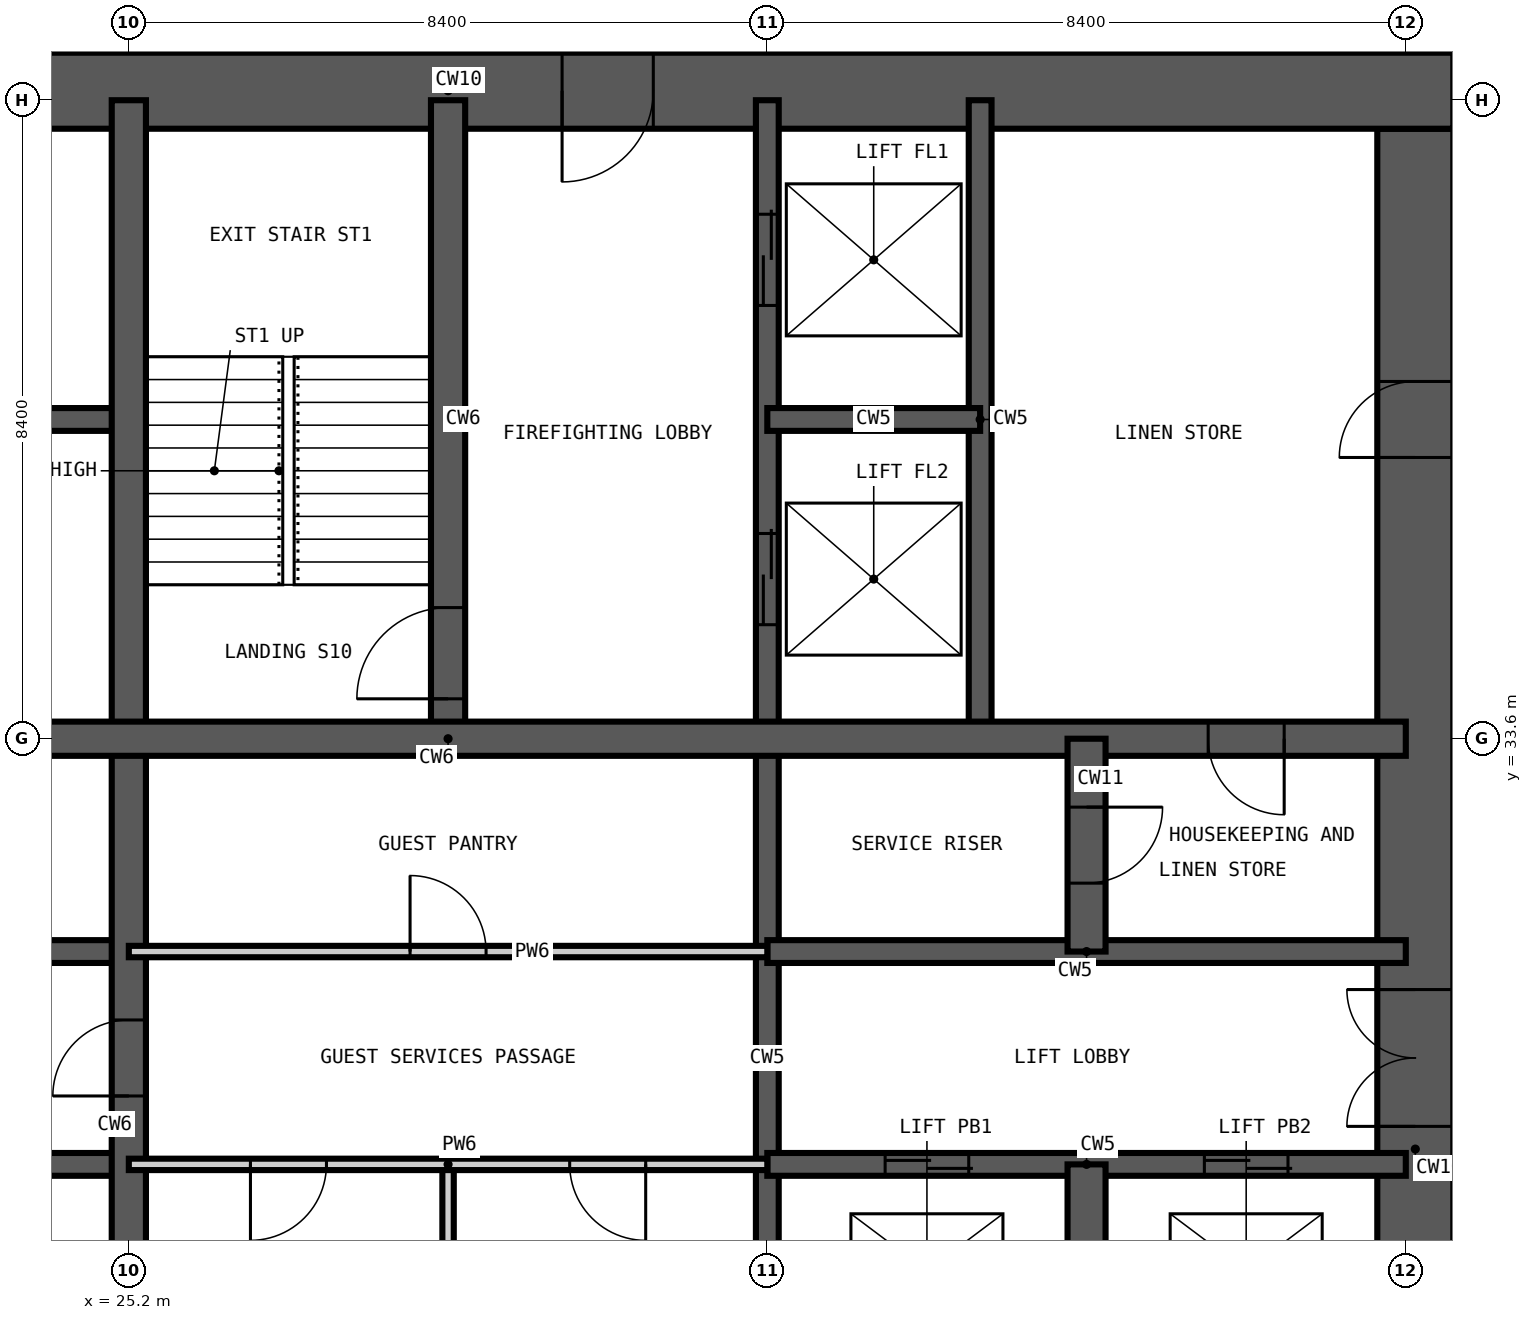
"""IFC4 building model, lengths in metres.
Left out: names, types, materials, properties, quantities, classifications, styles, units other than length and angle.
Written with IfcOpenShell. Run it as: python <this file> out.ifc"""

import sys

from ifc_helpers import new_model, si_unit, direction, frame, frame_2d, origin, place, context, subcontext, project, spatial, rectangle, extrude, element, fill, save


model = new_model("IFC4")
c1 = context("Model", 3, precision=1e-05, world=origin(), true_north=direction((0.0, 1.0)))
c2 = subcontext(c1, "Body", "Model", "MODEL_VIEW")
j1 = project(units=[si_unit("LENGTHUNIT", "METRE"), si_unit("PLANEANGLEUNIT", "RADIAN")], contexts=[c1])
p1 = place(None, origin())
s1 = spatial("IfcSite", under=j1, at=p1, CompositionType="ELEMENT")
p2 = place(p1, origin())
s2 = spatial("IfcBuilding", under=s1, at=p2, CompositionType="ELEMENT")
p3 = place(p2, frame((0.0, 0.0, 118.8)))
s3 = spatial("IfcBuildingStorey", under=s2, at=p3, CompositionType="ELEMENT", Elevation=118.8)
p4 = place(p3, frame((42.125, 17.175, -0.35), z_axis=(0.0, 0.0, 1.0), x_axis=(0.0, 1.0, 0.0)))
e1 = element("IfcWall", 1, at=p4, inside=s3, PredefinedType="SHEAR", context=c2, shape_type="SweptSolid", body=[
    extrude(rectangle(XDim=24.45, YDim=1.0, at=frame_2d((12.225, 0.0))), origin(), (0.0, 0.0, 1.0), 3.6),
])
p5 = place(p4, frame((0.425, 0.0, 0.35)))
e2 = element("IfcOpeningElement", 2, at=p5, cuts=e1, PredefinedType="OPENING", context=c2, shape_type="SweptSolid", body=[
    extrude(rectangle(XDim=1.2, YDim=2.2, at=frame_2d((0.6, 1.1))), frame((0.0, 0.51, 0.0), z_axis=(0.0, -1.0, 0.0), x_axis=(1.0, 0.0, 0.0)), (0.0, 0.0, 1.0), 1.02),
])
p6 = place(p4, frame((11.325, 0.0, 0.35)))
e3 = element("IfcOpeningElement", 3, at=p6, cuts=e1, PredefinedType="OPENING", context=c2, shape_type="SweptSolid", body=[
    extrude(rectangle(XDim=1.8, YDim=2.2, at=frame_2d((0.9, 1.1))), frame((0.0, 0.51, 0.0), z_axis=(0.0, -1.0, 0.0), x_axis=(1.0, 0.0, 0.0)), (0.0, 0.0, 1.0), 1.02),
])
p7 = place(p4, frame((20.125, 0.0, 0.35)))
e4 = element("IfcOpeningElement", 4, at=p7, cuts=e1, PredefinedType="OPENING", context=c2, shape_type="SweptSolid", body=[
    extrude(rectangle(XDim=1.0, YDim=2.1, at=frame_2d((0.5, 1.05))), frame((0.0, 0.51, 0.0), z_axis=(0.0, -1.0, 0.0), x_axis=(1.0, 0.0, 0.0)), (0.0, 0.0, 1.0), 1.02),
])
p8 = place(p3, frame((42.625, 42.125, -0.35), z_axis=(0.0, 0.0, 1.0), x_axis=(-1.0, 0.0, 0.0)))
e5 = element("IfcWall", 5, at=p8, inside=s3, PredefinedType="SHEAR", context=c2, shape_type="SweptSolid", body=[
    extrude(rectangle(XDim=26.45, YDim=1.0, at=frame_2d((13.225, 0.0))), origin(), (0.0, 0.0, 1.0), 3.6),
])
p9 = place(p8, frame((21.125, 0.0, 0.35)))
e6 = element("IfcOpeningElement", 6, at=p9, cuts=e5, PredefinedType="OPENING", context=c2, shape_type="SweptSolid", body=[
    extrude(rectangle(XDim=1.0, YDim=2.1, at=frame_2d((0.5, 1.05))), frame((0.0, 0.51, 0.0), z_axis=(0.0, -1.0, 0.0), x_axis=(1.0, 0.0, 0.0)), (0.0, 0.0, 1.0), 1.02),
])
p10 = place(p8, frame((10.525, 0.0, 0.35)))
e7 = element("IfcOpeningElement", 7, at=p10, cuts=e5, PredefinedType="OPENING", context=c2, shape_type="SweptSolid", body=[
    extrude(rectangle(XDim=1.2, YDim=2.2, at=frame_2d((0.6, 1.1))), frame((0.0, 0.51, 0.0), z_axis=(0.0, -1.0, 0.0), x_axis=(1.0, 0.0, 0.0)), (0.0, 0.0, 1.0), 1.02),
])
p11 = place(p3, frame((33.6, 16.8, -0.35), z_axis=(0.0, 0.0, 1.0), x_axis=(0.0, 1.0, 0.0)))
e8 = element("IfcWall", 8, at=p11, inside=s3, PredefinedType="SHEAR", context=c2, shape_type="SweptSolid", body=[
    extrude(rectangle(XDim=25.2, YDim=0.3, at=frame_2d((12.6, 0.0))), origin(), (0.0, 0.0, 1.0), 3.6),
])
p12 = place(p11, frame((22.5, 0.0, 0.35)))
e9 = element("IfcOpeningElement", 9, at=p12, cuts=e8, PredefinedType="OPENING", context=c2, shape_type="SweptSolid", body=[
    extrude(rectangle(XDim=1.2, YDim=2.2, at=frame_2d((0.6, 1.1))), frame((0.0, 0.16, 0.0), z_axis=(0.0, -1.0, 0.0), x_axis=(1.0, 0.0, 0.0)), (0.0, 0.0, 1.0), 0.32),
])
p13 = place(p11, frame((18.3, 0.0, 0.35)))
e10 = element("IfcOpeningElement", 10, at=p13, cuts=e8, PredefinedType="OPENING", context=c2, shape_type="SweptSolid", body=[
    extrude(rectangle(XDim=1.2, YDim=2.2, at=frame_2d((0.6, 1.1))), frame((0.0, 0.16, 0.0), z_axis=(0.0, -1.0, 0.0), x_axis=(1.0, 0.0, 0.0)), (0.0, 0.0, 1.0), 0.32),
])
p14 = place(p3, frame((36.4, 33.6, -0.35), z_axis=(0.0, 0.0, 1.0), x_axis=(0.0, 1.0, 0.0)))
e11 = element("IfcWall", 11, at=p14, inside=s3, PredefinedType="SHEAR", context=c2, shape_type="SweptSolid", body=[
    extrude(rectangle(XDim=8.4, YDim=0.3, at=frame_2d((4.2, 0.0))), origin(), (0.0, 0.0, 1.0), 3.6),
])
p15 = place(p3, frame((16.8, 28.0, -0.35), z_axis=(0.0, 0.0, 1.0), x_axis=(1.0, 0.0, 0.0)))
e12 = element("IfcWall", 12, at=p15, inside=s3, PredefinedType="SHEAR", context=c2, shape_type="SweptSolid", body=[
    extrude(rectangle(XDim=8.4, YDim=0.3, at=frame_2d((4.2, 0.0))), origin(), (0.0, 0.0, 1.0), 3.6),
])
p16 = place(p15, frame((1.55, 0.0, 0.35)))
e13 = element("IfcOpeningElement", 13, at=p16, cuts=e12, PredefinedType="OPENING", context=c2, shape_type="SweptSolid", body=[
    extrude(rectangle(XDim=1.1, YDim=2.2, at=frame_2d((0.55, 1.1))), frame((0.0, 0.16, 0.0), z_axis=(0.0, -1.0, 0.0), x_axis=(1.0, 0.0, 0.0)), (0.0, 0.0, 1.0), 0.32),
])
p17 = place(p15, frame((5.75, 0.0, 0.35)))
e14 = element("IfcOpeningElement", 14, at=p17, cuts=e12, PredefinedType="OPENING", context=c2, shape_type="SweptSolid", body=[
    extrude(rectangle(XDim=1.1, YDim=2.2, at=frame_2d((0.55, 1.1))), frame((0.0, 0.16, 0.0), z_axis=(0.0, -1.0, 0.0), x_axis=(1.0, 0.0, 0.0)), (0.0, 0.0, 1.0), 0.32),
])
p18 = place(p3, frame((33.6, 28.0, -0.35), z_axis=(0.0, 0.0, 1.0), x_axis=(1.0, 0.0, 0.0)))
e15 = element("IfcWall", 15, at=p18, inside=s3, PredefinedType="SHEAR", context=c2, shape_type="SweptSolid", body=[
    extrude(rectangle(XDim=8.4, YDim=0.3, at=frame_2d((4.2, 0.0))), origin(), (0.0, 0.0, 1.0), 3.6),
])
p19 = place(p18, frame((1.55, 0.0, 0.35)))
e16 = element("IfcOpeningElement", 16, at=p19, cuts=e15, PredefinedType="OPENING", context=c2, shape_type="SweptSolid", body=[
    extrude(rectangle(XDim=1.1, YDim=2.2, at=frame_2d((0.55, 1.1))), frame((0.0, 0.16, 0.0), z_axis=(0.0, -1.0, 0.0), x_axis=(1.0, 0.0, 0.0)), (0.0, 0.0, 1.0), 0.32),
])
p20 = place(p18, frame((5.75, 0.0, 0.35)))
e17 = element("IfcOpeningElement", 17, at=p20, cuts=e15, PredefinedType="OPENING", context=c2, shape_type="SweptSolid", body=[
    extrude(rectangle(XDim=1.1, YDim=2.2, at=frame_2d((0.55, 1.1))), frame((0.0, 0.16, 0.0), z_axis=(0.0, -1.0, 0.0), x_axis=(1.0, 0.0, 0.0)), (0.0, 0.0, 1.0), 0.32),
])
p21 = place(p3, frame((16.8, 30.8, -0.35), z_axis=(0.0, 0.0, 1.0), x_axis=(1.0, 0.0, 0.0)))
e18 = element("IfcWall", 18, at=p21, inside=s3, PredefinedType="SHEAR", context=c2, shape_type="SweptSolid", body=[
    extrude(rectangle(XDim=8.4, YDim=0.3, at=frame_2d((4.2, 0.0))), origin(), (0.0, 0.0, 1.0), 3.6),
])
p22 = place(p21, frame((1.55, 0.0, 0.35)))
e19 = element("IfcOpeningElement", 19, at=p22, cuts=e18, PredefinedType="OPENING", context=c2, shape_type="SweptSolid", body=[
    extrude(rectangle(XDim=1.1, YDim=2.2, at=frame_2d((0.55, 1.1))), frame((0.0, 0.16, 0.0), z_axis=(0.0, -1.0, 0.0), x_axis=(1.0, 0.0, 0.0)), (0.0, 0.0, 1.0), 0.32),
])
p23 = place(p21, frame((5.75, 0.0, 0.35)))
e20 = element("IfcOpeningElement", 20, at=p23, cuts=e18, PredefinedType="OPENING", context=c2, shape_type="SweptSolid", body=[
    extrude(rectangle(XDim=1.1, YDim=2.2, at=frame_2d((0.55, 1.1))), frame((0.0, 0.16, 0.0), z_axis=(0.0, -1.0, 0.0), x_axis=(1.0, 0.0, 0.0)), (0.0, 0.0, 1.0), 0.32),
])
for number, where, z_axis, x_axis in (
    (21, (33.6, 30.8, -0.35), (0.0, 0.0, 1.0), (1.0, 0.0, 0.0)),
    (22, (16.8, 37.8, -0.35), (0.0, 0.0, 1.0), (1.0, 0.0, 0.0)),
):
    element("IfcWall", number, at=place(p3, frame(where, z_axis=z_axis, x_axis=x_axis)), inside=s3, PredefinedType="SHEAR", context=c2, shape_type="SweptSolid", body=[
        extrude(rectangle(XDim=8.4, YDim=0.3, at=frame_2d((4.2, 0.0))), origin(), (0.0, 0.0, 1.0), 3.6),
    ])
p24 = place(p3, frame((33.6, 37.8, -0.35), z_axis=(0.0, 0.0, 1.0), x_axis=(1.0, 0.0, 0.0)))
e23 = element("IfcWall", 23, at=p24, inside=s3, PredefinedType="SHEAR", context=c2, shape_type="SweptSolid", body=[
    extrude(rectangle(XDim=2.8, YDim=0.3, at=frame_2d((1.4, 0.0))), origin(), (0.0, 0.0, 1.0), 3.6),
])
p25 = place(p3, frame((25.2, 16.8, -0.35), z_axis=(0.0, 0.0, 1.0), x_axis=(0.0, 1.0, 0.0)))
e24 = element("IfcWall", 24, at=p25, inside=s3, PredefinedType="SHEAR", context=c2, shape_type="SweptSolid", body=[
    extrude(rectangle(XDim=25.2, YDim=0.45, at=frame_2d((12.6, 0.0))), origin(), (0.0, 0.0, 1.0), 3.6),
])
p26 = place(p25, frame((12.1, 0.0, 0.35)))
e25 = element("IfcOpeningElement", 25, at=p26, cuts=e24, PredefinedType="OPENING", context=c2, shape_type="SweptSolid", body=[
    extrude(rectangle(XDim=1.0, YDim=2.1, at=frame_2d((0.5, 1.05))), frame((0.0, 0.235, 0.0), z_axis=(0.0, -1.0, 0.0), x_axis=(1.0, 0.0, 0.0)), (0.0, 0.0, 1.0), 0.47),
])
p27 = place(p3, frame((29.4, 33.6, -0.35), z_axis=(0.0, 0.0, 1.0), x_axis=(0.0, 1.0, 0.0)))
e26 = element("IfcWall", 26, at=p27, inside=s3, PredefinedType="SHEAR", context=c2, shape_type="SweptSolid", body=[
    extrude(rectangle(XDim=8.4, YDim=0.45, at=frame_2d((4.2, 0.0))), origin(), (0.0, 0.0, 1.0), 3.6),
])
p28 = place(p27, frame((0.525, 0.0, 0.35)))
e27 = element("IfcOpeningElement", 27, at=p28, cuts=e26, PredefinedType="OPENING", context=c2, shape_type="SweptSolid", body=[
    extrude(rectangle(XDim=1.2, YDim=2.2, at=frame_2d((0.6, 1.1))), frame((0.0, 0.235, 0.0), z_axis=(0.0, -1.0, 0.0), x_axis=(1.0, 0.0, 0.0)), (0.0, 0.0, 1.0), 0.47),
])
p29 = place(p3, frame((16.8, 33.6, -0.35), z_axis=(0.0, 0.0, 1.0), x_axis=(1.0, 0.0, 0.0)))
e28 = element("IfcWall", 28, at=p29, inside=s3, PredefinedType="SHEAR", context=c2, shape_type="SweptSolid", body=[
    extrude(rectangle(XDim=25.2, YDim=0.45, at=frame_2d((12.6, 0.0))), origin(), (0.0, 0.0, 1.0), 3.6),
])
p30 = place(p29, frame((22.6, 0.0, 0.35)))
e29 = element("IfcOpeningElement", 29, at=p30, cuts=e28, PredefinedType="OPENING", context=c2, shape_type="SweptSolid", body=[
    extrude(rectangle(XDim=1.0, YDim=2.1, at=frame_2d((0.5, 1.05))), frame((0.0, 0.235, 0.0), z_axis=(0.0, -1.0, 0.0), x_axis=(1.0, 0.0, 0.0)), (0.0, 0.0, 1.0), 0.47),
])
p31 = place(p3, frame((37.8, 16.8, -0.35), z_axis=(0.0, 0.0, 1.0), x_axis=(0.0, 1.0, 0.0)))
e30 = element("IfcWall", 30, at=p31, inside=s3, PredefinedType="SHEAR", context=c2, shape_type="SweptSolid", body=[
    extrude(rectangle(XDim=11.2, YDim=0.5, at=frame_2d((5.6, 0.0))), origin(), (0.0, 0.0, 1.0), 3.6),
])
p32 = place(p3, frame((37.8, 30.8, -0.35), z_axis=(0.0, 0.0, 1.0), x_axis=(0.0, 1.0, 0.0)))
e31 = element("IfcWall", 31, at=p32, inside=s3, PredefinedType="SHEAR", context=c2, shape_type="SweptSolid", body=[
    extrude(rectangle(XDim=2.8, YDim=0.5, at=frame_2d((1.4, 0.0))), origin(), (0.0, 0.0, 1.0), 3.6),
])
p33 = place(p32, frame((0.9, 0.0, 0.35)))
e32 = element("IfcOpeningElement", 32, at=p33, cuts=e31, PredefinedType="OPENING", context=c2, shape_type="SweptSolid", body=[
    extrude(rectangle(XDim=1.0, YDim=2.1, at=frame_2d((0.5, 1.05))), frame((0.0, 0.26, 0.0), z_axis=(0.0, -1.0, 0.0), x_axis=(1.0, 0.0, 0.0)), (0.0, 0.0, 1.0), 0.52),
])
p34 = place(p3, frame((29.4, 25.2, 0.0), z_axis=(0.0, 0.0, 1.0), x_axis=(0.0, 1.0, 0.0)))
e33 = element("IfcWall", 33, at=p34, inside=s3, PredefinedType="PARTITIONING", context=c2, shape_type="SweptSolid", body=[
    extrude(rectangle(XDim=2.8, YDim=0.15, at=frame_2d((1.4, 0.0))), origin(), (0.0, 0.0, 1.0), 3.25),
])
p35 = place(p3, frame((25.2, 28.0, 0.0), z_axis=(0.0, 0.0, 1.0), x_axis=(1.0, 0.0, 0.0)))
e34 = element("IfcWall", 34, at=p35, inside=s3, PredefinedType="PARTITIONING", context=c2, shape_type="SweptSolid", body=[
    extrude(rectangle(XDim=8.4, YDim=0.15, at=frame_2d((4.2, 0.0))), origin(), (0.0, 0.0, 1.0), 3.25),
])
p36 = place(p35, frame((1.6, 0.0, 0.0)))
e35 = element("IfcOpeningElement", 35, at=p36, cuts=e34, PredefinedType="OPENING", context=c2, shape_type="SweptSolid", body=[
    extrude(rectangle(XDim=1.0, YDim=2.1, at=frame_2d((0.5, 1.05))), frame((0.0, 0.085, 0.0), z_axis=(0.0, -1.0, 0.0), x_axis=(1.0, 0.0, 0.0)), (0.0, 0.0, 1.0), 0.17),
])
p37 = place(p35, frame((5.8, 0.0, 0.0)))
e36 = element("IfcOpeningElement", 36, at=p37, cuts=e34, PredefinedType="OPENING", context=c2, shape_type="SweptSolid", body=[
    extrude(rectangle(XDim=1.0, YDim=2.1, at=frame_2d((0.5, 1.05))), frame((0.0, 0.085, 0.0), z_axis=(0.0, -1.0, 0.0), x_axis=(1.0, 0.0, 0.0)), (0.0, 0.0, 1.0), 0.17),
])
p38 = place(p3, frame((25.2, 30.8, 0.0), z_axis=(0.0, 0.0, 1.0), x_axis=(1.0, 0.0, 0.0)))
e37 = element("IfcWall", 37, at=p38, inside=s3, PredefinedType="PARTITIONING", context=c2, shape_type="SweptSolid", body=[
    extrude(rectangle(XDim=8.4, YDim=0.15, at=frame_2d((4.2, 0.0))), origin(), (0.0, 0.0, 1.0), 3.25),
])
p39 = place(p38, frame((3.7, 0.0, 0.0)))
e38 = element("IfcOpeningElement", 38, at=p39, cuts=e37, PredefinedType="OPENING", context=c2, shape_type="SweptSolid", body=[
    extrude(rectangle(XDim=1.0, YDim=2.1, at=frame_2d((0.5, 1.05))), frame((0.0, 0.085, 0.0), z_axis=(0.0, -1.0, 0.0), x_axis=(1.0, 0.0, 0.0)), (0.0, 0.0, 1.0), 0.17),
])
p40 = place(p28, origin())
e39 = element("IfcDoor", 39, at=p40, inside=s3, OperationType="SINGLE_SWING_LEFT", PredefinedType="DOOR", context=c2, shape_type="SweptSolid", body=[
    extrude(rectangle(XDim=1.2, YDim=2.2, at=frame_2d((0.6, 1.1))), frame((0.0, 0.025, 0.0), z_axis=(0.0, -1.0, 0.0), x_axis=(1.0, 0.0, 0.0)), (0.0, 0.0, 1.0), 0.05),
])
fill(e27, e39)
p41 = place(p19, origin())
e40 = element("IfcDoor", 40, at=p41, inside=s3, OperationType="DOUBLE_DOOR_SLIDING", PredefinedType="DOOR", context=c2, shape_type="SweptSolid", body=[
    extrude(rectangle(XDim=1.1, YDim=2.2, at=frame_2d((0.55, 1.1))), frame((0.0, 0.025, 0.0), z_axis=(0.0, -1.0, 0.0), x_axis=(1.0, 0.0, 0.0)), (0.0, 0.0, 1.0), 0.05),
])
fill(e16, e40)
p42 = place(p20, origin())
e41 = element("IfcDoor", 41, at=p42, inside=s3, OperationType="DOUBLE_DOOR_SLIDING", PredefinedType="DOOR", context=c2, shape_type="SweptSolid", body=[
    extrude(rectangle(XDim=1.1, YDim=2.2, at=frame_2d((0.55, 1.1))), frame((0.0, 0.025, 0.0), z_axis=(0.0, -1.0, 0.0), x_axis=(1.0, 0.0, 0.0)), (0.0, 0.0, 1.0), 0.05),
])
fill(e17, e41)
p43 = place(p12, origin())
e42 = element("IfcDoor", 42, at=p43, inside=s3, OperationType="DOUBLE_DOOR_SLIDING", PredefinedType="DOOR", context=c2, shape_type="SweptSolid", body=[
    extrude(rectangle(XDim=1.2, YDim=2.2, at=frame_2d((0.6, 1.1))), frame((0.0, 0.025, 0.0), z_axis=(0.0, -1.0, 0.0), x_axis=(1.0, 0.0, 0.0)), (0.0, 0.0, 1.0), 0.05),
])
fill(e9, e42)
p44 = place(p13, origin())
e43 = element("IfcDoor", 43, at=p44, inside=s3, OperationType="DOUBLE_DOOR_SLIDING", PredefinedType="DOOR", context=c2, shape_type="SweptSolid", body=[
    extrude(rectangle(XDim=1.2, YDim=2.2, at=frame_2d((0.6, 1.1))), frame((0.0, 0.025, 0.0), z_axis=(0.0, -1.0, 0.0), x_axis=(1.0, 0.0, 0.0)), (0.0, 0.0, 1.0), 0.05),
])
fill(e10, e43)
p45 = place(p26, origin())
e44 = element("IfcDoor", 44, at=p45, inside=s3, OperationType="SINGLE_SWING_LEFT", PredefinedType="DOOR", context=c2, shape_type="SweptSolid", body=[
    extrude(rectangle(XDim=1.0, YDim=2.1, at=frame_2d((0.5, 1.05))), frame((0.0, 0.025, 0.0), z_axis=(0.0, -1.0, 0.0), x_axis=(1.0, 0.0, 0.0)), (0.0, 0.0, 1.0), 0.05),
])
fill(e25, e44)
p46 = place(p36, frame((1.0, 0.0, 0.0), z_axis=(0.0, 0.0, 1.0), x_axis=(-1.0, 0.0, 0.0)))
e45 = element("IfcDoor", 45, at=p46, inside=s3, OperationType="SINGLE_SWING_RIGHT", PredefinedType="DOOR", context=c2, shape_type="SweptSolid", body=[
    extrude(rectangle(XDim=1.0, YDim=2.1, at=frame_2d((0.5, 1.05))), frame((0.0, 0.025, 0.0), z_axis=(0.0, -1.0, 0.0), x_axis=(1.0, 0.0, 0.0)), (0.0, 0.0, 1.0), 0.05),
])
fill(e35, e45)
p47 = place(p37, frame((1.0, 0.0, 0.0), z_axis=(0.0, 0.0, 1.0), x_axis=(-1.0, 0.0, 0.0)))
e46 = element("IfcDoor", 46, at=p47, inside=s3, OperationType="SINGLE_SWING_LEFT", PredefinedType="DOOR", context=c2, shape_type="SweptSolid", body=[
    extrude(rectangle(XDim=1.0, YDim=2.1, at=frame_2d((0.5, 1.05))), frame((0.0, 0.025, 0.0), z_axis=(0.0, -1.0, 0.0), x_axis=(1.0, 0.0, 0.0)), (0.0, 0.0, 1.0), 0.05),
])
fill(e36, e46)
p48 = place(p39, origin())
e47 = element("IfcDoor", 47, at=p48, inside=s3, OperationType="SINGLE_SWING_LEFT", PredefinedType="DOOR", context=c2, shape_type="SweptSolid", body=[
    extrude(rectangle(XDim=1.0, YDim=2.1, at=frame_2d((0.5, 1.05))), frame((0.0, 0.025, 0.0), z_axis=(0.0, -1.0, 0.0), x_axis=(1.0, 0.0, 0.0)), (0.0, 0.0, 1.0), 0.05),
])
fill(e38, e47)
p49 = place(p33, frame((1.0, 0.0, 0.0), z_axis=(0.0, 0.0, 1.0), x_axis=(-1.0, 0.0, 0.0)))
e48 = element("IfcDoor", 48, at=p49, inside=s3, OperationType="SINGLE_SWING_LEFT", PredefinedType="DOOR", context=c2, shape_type="SweptSolid", body=[
    extrude(rectangle(XDim=1.0, YDim=2.1, at=frame_2d((0.5, 1.05))), frame((0.0, 0.025, 0.0), z_axis=(0.0, -1.0, 0.0), x_axis=(1.0, 0.0, 0.0)), (0.0, 0.0, 1.0), 0.05),
])
fill(e32, e48)
p50 = place(p30, frame((1.0, 0.0, 0.0), z_axis=(0.0, 0.0, 1.0), x_axis=(-1.0, 0.0, 0.0)))
e49 = element("IfcDoor", 49, at=p50, inside=s3, OperationType="SINGLE_SWING_LEFT", PredefinedType="DOOR", context=c2, shape_type="SweptSolid", body=[
    extrude(rectangle(XDim=1.0, YDim=2.1, at=frame_2d((0.5, 1.05))), frame((0.0, 0.025, 0.0), z_axis=(0.0, -1.0, 0.0), x_axis=(1.0, 0.0, 0.0)), (0.0, 0.0, 1.0), 0.05),
])
fill(e29, e49)
p51 = place(p6, origin())
e50 = element("IfcDoor", 50, at=p51, inside=s3, OperationType="DOUBLE_DOOR_DOUBLE_SWING", PredefinedType="DOOR", context=c2, shape_type="SweptSolid", body=[
    extrude(rectangle(XDim=1.8, YDim=2.2, at=frame_2d((0.9, 1.1))), frame((0.0, 0.025, 0.0), z_axis=(0.0, -1.0, 0.0), x_axis=(1.0, 0.0, 0.0)), (0.0, 0.0, 1.0), 0.05),
])
fill(e3, e50)
p52 = place(p10, origin())
e51 = element("IfcDoor", 51, at=p52, inside=s3, OperationType="SINGLE_SWING_RIGHT", PredefinedType="DOOR", context=c2, shape_type="SweptSolid", body=[
    extrude(rectangle(XDim=1.2, YDim=2.2, at=frame_2d((0.6, 1.1))), frame((0.0, 0.025, 0.0), z_axis=(0.0, -1.0, 0.0), x_axis=(1.0, 0.0, 0.0)), (0.0, 0.0, 1.0), 0.05),
])
fill(e7, e51)
p53 = place(p7, origin())
e52 = element("IfcDoor", 52, at=p53, inside=s3, OperationType="SINGLE_SWING_LEFT", PredefinedType="DOOR", context=c2, shape_type="SweptSolid", body=[
    extrude(rectangle(XDim=1.0, YDim=2.1, at=frame_2d((0.5, 1.05))), frame((0.0, 0.025, 0.0), z_axis=(0.0, -1.0, 0.0), x_axis=(1.0, 0.0, 0.0)), (0.0, 0.0, 1.0), 0.05),
])
fill(e4, e52)
save(model, sys.argv[1])
